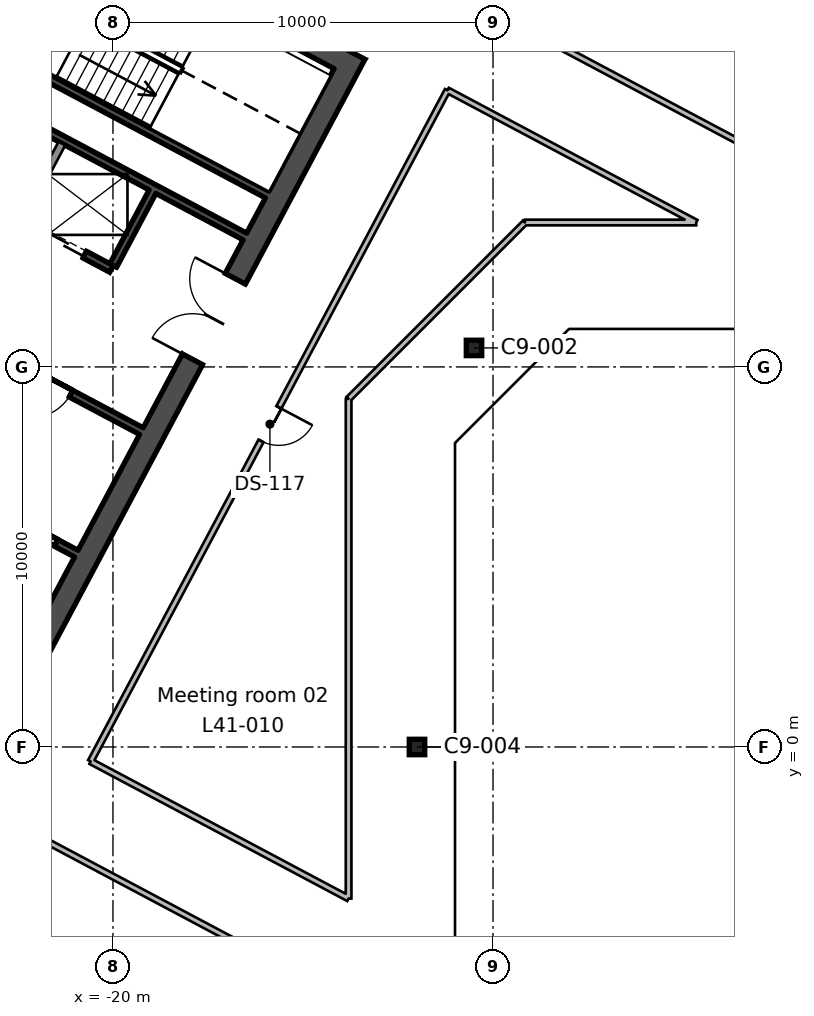
"""IFC4 building model, lengths in metres.
Left out: names, types, materials, properties, quantities, classifications, styles, units other than length and angle.
Written with IfcOpenShell. Run it as: python <this file> out.ifc"""

import sys

from ifc_helpers import new_model, si_unit, direction, frame, frame_2d, origin, origin_2d, place, context, subcontext, project, spatial, rectangle, hollow_rectangle, extrude, element, fill, save


model = new_model("IFC4")
c1 = context("Model", 3, precision=1e-05, world=origin(), true_north=direction((0.0, 1.0)))
c2 = subcontext(c1, "Body", "Model", "MODEL_VIEW")
j1 = project(units=[si_unit("LENGTHUNIT", "METRE"), si_unit("PLANEANGLEUNIT", "RADIAN")], contexts=[c1])
p1 = place(None, origin())
s1 = spatial("IfcSite", under=j1, at=p1, CompositionType="ELEMENT")
p2 = place(p1, origin())
s2 = spatial("IfcBuilding", under=s1, at=p2, CompositionType="ELEMENT")
p3 = place(p2, frame((0.0, 0.0, 193.5)))
s3 = spatial("IfcBuildingStorey", under=s2, at=p3, CompositionType="ELEMENT", Elevation=193.5)
for number, where, z_axis, x_axis in (
    (1, (-12.0, 0.0, 0.0), (0.0, 0.0, 1.0), (1.0, 0.0, 0.0)),
    (2, (-10.5, 10.5, 0.0), (0.0, 0.0, 1.0), (1.0, 0.0, 0.0)),
):
    element("IfcColumn", number, at=place(p3, frame(where, z_axis=z_axis, x_axis=x_axis)), inside=s3, PredefinedType="COLUMN", context=c2, shape_type="SweptSolid", body=[
        extrude(hollow_rectangle(XDim=0.406, YDim=0.406, WallThickness=0.015, InnerFilletRadius=0.007, OuterFilletRadius=0.022, at=origin_2d()), origin(), (0.0, 0.0, 1.0), 3.9),
    ])
p4 = place(p3, frame((-13.635, 18.236, 0.0), z_axis=(0.0, 0.0, 1.0), x_axis=(-0.469478769487, -0.88294376095, 0.0)))
e3 = element("IfcWall", 3, at=p4, inside=s3, PredefinedType="SHEAR", context=c2, shape_type="SweptSolid", body=[
    extrude(rectangle(XDim=19.4, YDim=0.6, at=frame_2d((9.7, 0.0))), origin(), (0.0, 0.0, 1.0), 3.9),
])
p5 = place(p4, frame((6.7, 0.0, 0.0)))
e4 = element("IfcOpeningElement", 4, at=p5, cuts=e3, PredefinedType="OPENING", context=c2, shape_type="SweptSolid", body=[
    extrude(rectangle(XDim=2.4, YDim=2.4, at=frame_2d((1.2, 1.2))), frame((0.0, 0.31, 0.0), z_axis=(0.0, -1.0, 0.0), x_axis=(1.0, 0.0, 0.0)), (0.0, 0.0, 1.0), 0.62),
])
p6 = place(p3, frame((-14.041, 18.112, 0.0), z_axis=(0.0, 0.0, 1.0), x_axis=(-0.882947755831, 0.46947125628, 0.0)))
e5 = element("IfcWall", 5, at=p6, inside=s3, PredefinedType="SHEAR", context=c2, shape_type="SweptSolid", body=[
    extrude(rectangle(XDim=20.2, YDim=0.6, at=frame_2d((10.1, 0.0))), origin(), (0.0, 0.0, 1.0), 3.9),
])
p7 = place(p3, frame((-18.96, 14.611, 0.0), z_axis=(0.0, 0.0, 1.0), x_axis=(-0.4694473164, -0.882960484464, 0.0)))
e6 = element("IfcWall", 6, at=p7, inside=s3, PredefinedType="SHEAR", context=c2, shape_type="SweptSolid", body=[
    extrude(rectangle(XDim=2.2, YDim=0.2, at=frame_2d((1.1, 0.0))), origin(), (0.0, 0.0, 1.0), 3.9),
])
p8 = place(p3, frame((-21.344, 15.879, 0.0), z_axis=(0.0, 0.0, 1.0), x_axis=(-0.4694473164, -0.882960484464, 0.0)))
e7 = element("IfcWall", 7, at=p8, inside=s3, PredefinedType="SOLIDWALL", context=c2, shape_type="SweptSolid", body=[
    extrude(rectangle(XDim=2.2, YDim=0.2, at=frame_2d((1.1, 0.0))), origin(), (0.0, 0.0, 1.0), 3.9),
])
p9 = place(p3, frame((-21.333, 21.649, 0.0), z_axis=(0.0, 0.0, 1.0), x_axis=(-0.469494272526, -0.882935517501, 0.0)))
e8 = element("IfcWall", 8, at=p9, inside=s3, PredefinedType="SHEAR", context=c2, shape_type="SweptSolid", body=[
    extrude(rectangle(XDim=7.3, YDim=0.2, at=frame_2d((3.65, 0.0))), origin(), (0.0, 0.0, 1.0), 3.9),
])
p10 = place(p9, frame((1.3, 0.0, 0.0)))
e9 = element("IfcOpeningElement", 9, at=p10, cuts=e8, PredefinedType="OPENING", context=c2, shape_type="SweptSolid", body=[
    extrude(rectangle(XDim=1.2, YDim=2.1, at=frame_2d((0.6, 1.05))), frame((0.0, 0.11, 0.0), z_axis=(0.0, -1.0, 0.0), x_axis=(1.0, 0.0, 0.0)), (0.0, 0.0, 1.0), 0.22),
])
p11 = place(p3, frame((-15.942, 14.536, 0.0), z_axis=(0.0, 0.0, 1.0), x_axis=(-0.882946947542, 0.469472776449, 0.0)))
e10 = element("IfcWall", 10, at=p11, inside=s3, PredefinedType="SHEAR", context=c2, shape_type="SweptSolid", body=[
    extrude(rectangle(XDim=8.0, YDim=0.2, at=frame_2d((4.0, 0.0))), origin(), (0.0, 0.0, 1.0), 3.9),
])
p12 = place(p3, frame((-16.529, 13.432, 0.0), z_axis=(0.0, 0.0, 1.0), x_axis=(-0.88295287151, 0.469461634952, 0.0)))
e11 = element("IfcWall", 11, at=p12, inside=s3, PredefinedType="SHEAR", context=c2, shape_type="SweptSolid", body=[
    extrude(rectangle(XDim=8.0, YDim=0.2, at=frame_2d((4.0, 0.0))), origin(), (0.0, 0.0, 1.0), 3.9),
])
p13 = place(p3, frame((-20.04, 12.581, 0.0), z_axis=(0.0, 0.0, 1.0), x_axis=(-0.882942972946, 0.469480251476, 0.0)))
e12 = element("IfcWall", 12, at=p13, inside=s3, PredefinedType="SHEAR", context=c2, shape_type="SweptSolid", body=[
    extrude(rectangle(XDim=5.4, YDim=0.2, at=frame_2d((2.7, 0.0))), origin(), (0.0, 0.0, 1.0), 3.9),
])
p14 = place(p13, frame((0.8, 0.0, 0.0)))
e13 = element("IfcOpeningElement", 13, at=p14, cuts=e12, PredefinedType="OPENING", context=c2, shape_type="SweptSolid", body=[
    extrude(rectangle(XDim=1.1, YDim=2.1, at=frame_2d((0.55, 1.05))), frame((0.0, 0.11, 0.0), z_axis=(0.0, -1.0, 0.0), x_axis=(1.0, 0.0, 0.0)), (0.0, 0.0, 1.0), 0.22),
])
p15 = place(p13, frame((3.5, 0.0, 0.0)))
e14 = element("IfcOpeningElement", 14, at=p15, cuts=e12, PredefinedType="OPENING", context=c2, shape_type="SweptSolid", body=[
    extrude(rectangle(XDim=1.1, YDim=2.1, at=frame_2d((0.55, 1.05))), frame((0.0, 0.11, 0.0), z_axis=(0.0, -1.0, 0.0), x_axis=(1.0, 0.0, 0.0)), (0.0, 0.0, 1.0), 0.22),
])
p16 = place(p3, frame((-19.252, 8.311, 0.0), z_axis=(0.0, 0.0, 1.0), x_axis=(-0.882955722218, 0.469456273365, 0.0)))
e15 = element("IfcWall", 15, at=p16, inside=s3, PredefinedType="SHEAR", context=c2, shape_type="SweptSolid", body=[
    extrude(rectangle(XDim=10.0, YDim=0.2, at=frame_2d((5.0, 0.0))), origin(), (0.0, 0.0, 1.0), 3.9),
])
p17 = place(p16, frame((2.1, 0.0, 0.0)))
e16 = element("IfcOpeningElement", 16, at=p17, cuts=e15, PredefinedType="OPENING", context=c2, shape_type="SweptSolid", body=[
    extrude(rectangle(XDim=1.2, YDim=2.1, at=frame_2d((0.6, 1.05))), frame((0.0, 0.11, 0.0), z_axis=(0.0, -1.0, 0.0), x_axis=(1.0, 0.0, 0.0)), (0.0, 0.0, 1.0), 0.22),
])
p18 = place(p16, frame((4.96, 0.0, 0.0)))
e17 = element("IfcOpeningElement", 17, at=p18, cuts=e15, PredefinedType="OPENING", context=c2, shape_type="SweptSolid", body=[
    extrude(rectangle(XDim=0.9, YDim=2.1, at=frame_2d((0.45, 1.05))), frame((0.0, 0.11, 0.0), z_axis=(0.0, -1.0, 0.0), x_axis=(1.0, 0.0, 0.0)), (0.0, 0.0, 1.0), 0.22),
])
p19 = place(p16, frame((7.66, 0.0, 0.0)))
e18 = element("IfcOpeningElement", 18, at=p19, cuts=e15, PredefinedType="OPENING", context=c2, shape_type="SweptSolid", body=[
    extrude(rectangle(XDim=0.9, YDim=2.1, at=frame_2d((0.45, 1.05))), frame((0.0, 0.11, 0.0), z_axis=(0.0, -1.0, 0.0), x_axis=(1.0, 0.0, 0.0)), (0.0, 0.0, 1.0), 0.22),
])
p20 = place(p3, frame((-20.965, 5.088, 0.0), z_axis=(0.0, 0.0, 1.0), x_axis=(-0.882925986334, 0.469512196493, 0.0)))
e19 = element("IfcWall", 19, at=p20, inside=s3, PredefinedType="SHEAR", context=c2, shape_type="SweptSolid", body=[
    extrude(rectangle(XDim=4.5, YDim=0.2, at=frame_2d((2.25, 0.0))), origin(), (0.0, 0.0, 1.0), 3.9),
])
p21 = place(p20, frame((0.6, 0.0, 0.0)))
e20 = element("IfcOpeningElement", 20, at=p21, cuts=e19, PredefinedType="OPENING", context=c2, shape_type="SweptSolid", body=[
    extrude(rectangle(XDim=1.1, YDim=2.1, at=frame_2d((0.55, 1.05))), frame((0.0, 0.11, 0.0), z_axis=(0.0, -1.0, 0.0), x_axis=(1.0, 0.0, 0.0)), (0.0, 0.0, 1.0), 0.22),
])
p22 = place(p3, frame((-48.541, 39.854, 0.0), z_axis=(0.0, 0.0, 1.0), x_axis=(0.882945008423, -0.469476423372, 0.0)))
e21 = element("IfcWall", 21, at=p22, inside=s3, PredefinedType="PARTITIONING", context=c2, shape_type="SweptSolid", body=[
    extrude(rectangle(XDim=54.976, YDim=0.15, at=frame_2d((27.488, 0.0))), origin(), (0.0, 0.0, 1.0), 3.54),
])
p23 = place(p22, frame((26.55, 0.0, 0.0)))
e22 = element("IfcOpeningElement", 22, at=p23, cuts=e21, PredefinedType="OPENING", context=c2, shape_type="SweptSolid", body=[
    extrude(rectangle(XDim=1.8, YDim=2.1, at=frame_2d((0.9, 1.05))), frame((0.0, 0.085, 0.0), z_axis=(0.0, -1.0, 0.0), x_axis=(1.0, 0.0, 0.0)), (0.0, 0.0, 1.0), 0.17),
])
p24 = place(p22, frame((21.049, 0.0, 0.0)))
e23 = element("IfcOpeningElement", 23, at=p24, cuts=e21, PredefinedType="OPENING", context=c2, shape_type="SweptSolid", body=[
    extrude(rectangle(XDim=1.0, YDim=2.1, at=frame_2d((0.5, 1.05))), frame((0.0, 0.085, 0.0), z_axis=(0.0, -1.0, 0.0), x_axis=(1.0, 0.0, 0.0)), (0.0, 0.0, 1.0), 0.17),
])
p25 = place(p22, frame((15.35, 0.0, 0.0)))
e24 = element("IfcOpeningElement", 24, at=p25, cuts=e21, PredefinedType="OPENING", context=c2, shape_type="SweptSolid", body=[
    extrude(rectangle(XDim=1.0, YDim=2.1, at=frame_2d((0.5, 1.05))), frame((0.0, 0.085, 0.0), z_axis=(0.0, -1.0, 0.0), x_axis=(1.0, 0.0, 0.0)), (0.0, 0.0, 1.0), 0.17),
])
p26 = place(p3, frame((-13.8, -6.706, 0.0), z_axis=(0.0, 0.0, 1.0), x_axis=(-0.882947286887, 0.469472138235, 0.0)))
e25 = element("IfcWall", 25, at=p26, inside=s3, PredefinedType="PARTITIONING", context=c2, shape_type="SweptSolid", body=[
    extrude(rectangle(XDim=36.571, YDim=0.15, at=frame_2d((18.285, 0.0))), origin(), (0.0, 0.0, 1.0), 3.54),
])
p27 = place(p26, frame((34.15, 0.0, 0.0)))
e26 = element("IfcOpeningElement", 26, at=p27, cuts=e25, PredefinedType="OPENING", context=c2, shape_type="SweptSolid", body=[
    extrude(rectangle(XDim=1.0, YDim=2.1, at=frame_2d((0.5, 1.05))), frame((0.0, 0.085, 0.0), z_axis=(0.0, -1.0, 0.0), x_axis=(1.0, 0.0, 0.0)), (0.0, 0.0, 1.0), 0.17),
])
p28 = place(p26, frame((17.35, 0.0, 0.0)))
e27 = element("IfcOpeningElement", 27, at=p28, cuts=e25, PredefinedType="OPENING", context=c2, shape_type="SweptSolid", body=[
    extrude(rectangle(XDim=1.8, YDim=2.1, at=frame_2d((0.9, 1.05))), frame((0.0, 0.085, 0.0), z_axis=(0.0, -1.0, 0.0), x_axis=(1.0, 0.0, 0.0)), (0.0, 0.0, 1.0), 0.17),
])
p29 = place(p3, frame((-20.588, -0.379, 0.0), z_axis=(0.0, 0.0, 1.0), x_axis=(0.469489882812, 0.882937851685, 0.0)))
e28 = element("IfcWall", 28, at=p29, inside=s3, PredefinedType="PARTITIONING", context=c2, shape_type="SweptSolid", body=[
    extrude(rectangle(XDim=20.0, YDim=0.15, at=frame_2d((10.0, 0.0))), origin(), (0.0, 0.0, 1.0), 3.54),
])
p30 = place(p29, frame((9.55, 0.0, 0.0)))
e29 = element("IfcOpeningElement", 29, at=p30, cuts=e28, PredefinedType="OPENING", context=c2, shape_type="SweptSolid", body=[
    extrude(rectangle(XDim=1.0, YDim=2.1, at=frame_2d((0.5, 1.05))), frame((0.0, 0.085, 0.0), z_axis=(0.0, -1.0, 0.0), x_axis=(1.0, 0.0, 0.0)), (0.0, 0.0, 1.0), 0.17),
])
p31 = place(p3, frame((-11.198, 17.28, 0.0), z_axis=(0.0, 0.0, 1.0), x_axis=(0.88294849999, -0.469469856717, 0.0)))
e30 = element("IfcWall", 30, at=p31, inside=s3, PredefinedType="PARTITIONING", context=c2, shape_type="SweptSolid", body=[
    extrude(rectangle(XDim=7.413, YDim=0.15, at=frame_2d((3.706, 0.0))), origin(), (0.0, 0.0, 1.0), 3.54),
])
p32 = place(p3, frame((-4.653, 13.8, 0.0), z_axis=(0.0, 0.0, 1.0), x_axis=(-1.0, 0.0, 0.0)))
e31 = element("IfcWall", 31, at=p32, inside=s3, PredefinedType="PARTITIONING", context=c2, shape_type="SweptSolid", body=[
    extrude(rectangle(XDim=4.507, YDim=0.15, at=frame_2d((2.253, 0.0))), origin(), (0.0, 0.0, 1.0), 3.54),
])
p33 = place(p3, frame((-9.16, 13.8, 0.0), z_axis=(0.0, 0.0, 1.0), x_axis=(-0.707106781187, -0.707106781187, 0.0)))
e32 = element("IfcWall", 32, at=p33, inside=s3, PredefinedType="PARTITIONING", context=c2, shape_type="SweptSolid", body=[
    extrude(rectangle(XDim=6.562, YDim=0.15, at=frame_2d((3.281, 0.0))), origin(), (0.0, 0.0, 1.0), 3.54),
])
p34 = place(p3, frame((-13.8, 9.16, 0.0), z_axis=(0.0, 0.0, 1.0), x_axis=(0.0, -1.0, 0.0)))
e33 = element("IfcWall", 33, at=p34, inside=s3, PredefinedType="PARTITIONING", context=c2, shape_type="SweptSolid", body=[
    extrude(rectangle(XDim=13.148, YDim=0.15, at=frame_2d((6.574, 0.0))), origin(), (0.0, 0.0, 1.0), 3.54),
])
p35 = place(p3, frame((-13.8, -3.988, 0.0), z_axis=(0.0, 0.0, 1.0), x_axis=(-0.882949137368, 0.469468657976, 0.0)))
e34 = element("IfcWall", 34, at=p35, inside=s3, PredefinedType="PARTITIONING", context=c2, shape_type="SweptSolid", body=[
    extrude(rectangle(XDim=7.688, YDim=0.15, at=frame_2d((3.844, 0.0))), origin(), (0.0, 0.0, 1.0), 3.54),
])
p36 = place(p5, frame((2.4, 0.0, 0.0), z_axis=(0.0, 0.0, 1.0), x_axis=(-1.0, 0.0, 0.0)))
e35 = element("IfcDoor", 35, at=p36, inside=s3, OperationType="DOUBLE_DOOR_SINGLE_SWING", PredefinedType="DOOR", context=c2, shape_type="SweptSolid", body=[
    extrude(rectangle(XDim=2.4, YDim=2.4, at=frame_2d((1.2, 1.2))), frame((0.0, 0.025, 0.0), z_axis=(0.0, -1.0, 0.0), x_axis=(1.0, 0.0, 0.0)), (0.0, 0.0, 1.0), 0.05),
])
fill(e4, e35)
p37 = place(p17, origin())
e36 = element("IfcDoor", 36, at=p37, inside=s3, OperationType="SINGLE_SWING_RIGHT", PredefinedType="DOOR", context=c2, shape_type="SweptSolid", body=[
    extrude(rectangle(XDim=1.2, YDim=2.1, at=frame_2d((0.6, 1.05))), frame((0.0, 0.025, 0.0), z_axis=(0.0, -1.0, 0.0), x_axis=(1.0, 0.0, 0.0)), (0.0, 0.0, 1.0), 0.05),
])
fill(e16, e36)
p38 = place(p14, origin())
e37 = element("IfcDoor", 37, at=p38, inside=s3, OperationType="DOUBLE_DOOR_SLIDING", PredefinedType="DOOR", context=c2, shape_type="SweptSolid", body=[
    extrude(rectangle(XDim=1.1, YDim=2.1, at=frame_2d((0.55, 1.05))), frame((0.0, 0.025, 0.0), z_axis=(0.0, -1.0, 0.0), x_axis=(1.0, 0.0, 0.0)), (0.0, 0.0, 1.0), 0.05),
])
fill(e13, e37)
p39 = place(p21, origin())
e38 = element("IfcDoor", 38, at=p39, inside=s3, OperationType="DOUBLE_DOOR_SLIDING", PredefinedType="DOOR", context=c2, shape_type="SweptSolid", body=[
    extrude(rectangle(XDim=1.1, YDim=2.1, at=frame_2d((0.55, 1.05))), frame((0.0, 0.025, 0.0), z_axis=(0.0, -1.0, 0.0), x_axis=(1.0, 0.0, 0.0)), (0.0, 0.0, 1.0), 0.05),
])
fill(e20, e38)
p40 = place(p30, frame((1.0, 0.0, 0.0), z_axis=(0.0, 0.0, 1.0), x_axis=(-1.0, 0.0, 0.0)))
e39 = element("IfcDoor", 39, at=p40, inside=s3, OperationType="SINGLE_SWING_LEFT", PredefinedType="DOOR", context=c2, shape_type="SweptSolid", body=[
    extrude(rectangle(XDim=1.0, YDim=2.1, at=frame_2d((0.5, 1.05))), frame((0.0, 0.025, 0.0), z_axis=(0.0, -1.0, 0.0), x_axis=(1.0, 0.0, 0.0)), (0.0, 0.0, 1.0), 0.05),
])
fill(e29, e39)
save(model, sys.argv[1])
